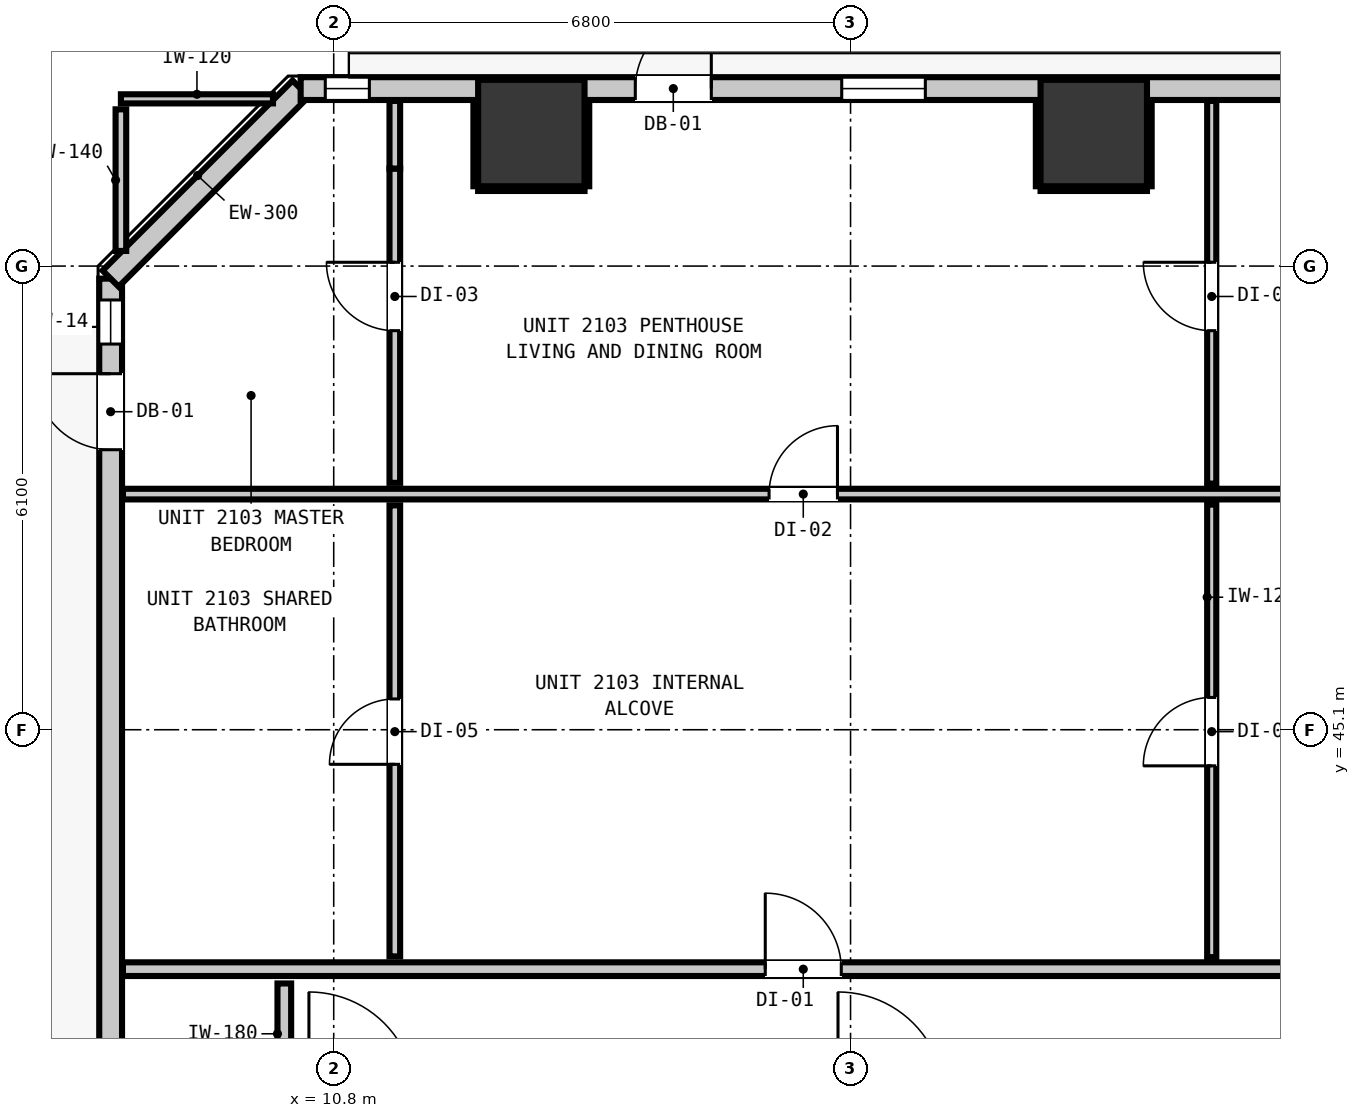
"""IFC4 building model, lengths in metres.
Left out: names, types, materials, properties, quantities, classifications, styles, units other than length and angle.
Written with IfcOpenShell. Run it as: python <this file> out.ifc"""

import sys

from ifc_helpers import new_model, si_unit, direction, frame, frame_2d, origin, origin_2d, place, context, subcontext, project, spatial, rectangle, extrude, element, fill, save


model = new_model("IFC4")
c1 = context("Model", 3, precision=1e-05, world=origin(), true_north=direction((0.0, 1.0)))
c2 = subcontext(c1, "Body", "Model", "MODEL_VIEW")
j1 = project(units=[si_unit("LENGTHUNIT", "METRE"), si_unit("PLANEANGLEUNIT", "RADIAN")], contexts=[c1])
p1 = place(None, origin())
s1 = spatial("IfcSite", under=j1, at=p1, CompositionType="ELEMENT")
p2 = place(p1, origin())
s2 = spatial("IfcBuilding", under=s1, at=p2, CompositionType="ELEMENT")
p3 = place(p2, frame((0.0, 0.0, 75.12)))
s3 = spatial("IfcBuildingStorey", under=s2, at=p3, CompositionType="ELEMENT", Elevation=75.12)
for number, where, z_axis, x_axis in (
    (1, (13.4, 52.95, 0.0), (0.0, 0.0, 1.0), (1.0, 0.0, 0.0)),
    (2, (20.8, 52.95, 0.0), (0.0, 0.0, 1.0), (1.0, 0.0, 0.0)),
):
    element("IfcColumn", number, at=place(p3, frame(where, z_axis=z_axis, x_axis=x_axis)), inside=s3, PredefinedType="COLUMN", context=c2, shape_type="SweptSolid", body=[
        extrude(rectangle(XDim=1.4, YDim=1.4, at=origin_2d()), origin(), (0.0, 0.0, 1.0), 3.32),
    ])
p4 = place(p3, frame((7.865, 16.365, 0.0), z_axis=(0.0, 0.0, 1.0), x_axis=(0.0, 1.0, 0.0)))
e3 = element("IfcWall", 3, at=p4, inside=s3, PredefinedType="STANDARD", context=c2, shape_type="SweptSolid", body=[
    extrude(rectangle(XDim=34.67, YDim=0.3, at=frame_2d((17.335, 0.0))), origin(), (0.0, 0.0, 1.0), 3.06),
])
p5 = place(p4, frame((32.419, 0.0, 0.0)))
e4 = element("IfcOpeningElement", 4, at=p5, cuts=e3, PredefinedType="OPENING", context=c2, shape_type="SweptSolid", body=[
    extrude(rectangle(XDim=1.0, YDim=2.15, at=frame_2d((0.5, 1.075))), frame((0.0, 0.16, 0.0), z_axis=(0.0, -1.0, 0.0), x_axis=(1.0, 0.0, 0.0)), (0.0, 0.0, 1.0), 0.32),
])
p6 = place(p4, frame((33.809, 0.0, 0.85)))
e5 = element("IfcOpeningElement", 5, at=p6, cuts=e3, PredefinedType="OPENING", context=c2, shape_type="SweptSolid", body=[
    extrude(rectangle(XDim=0.58, YDim=1.5, at=frame_2d((0.29, 0.75))), frame((0.0, 0.16, 0.0), z_axis=(0.0, -1.0, 0.0), x_axis=(1.0, 0.0, 0.0)), (0.0, 0.0, 1.0), 0.32),
])
p7 = place(p3, frame((7.865, 51.035, 0.0), z_axis=(0.0, 0.0, 1.0), x_axis=(0.707106781187, 0.707106781187, 0.0)))
e6 = element("IfcWall", 6, at=p7, inside=s3, PredefinedType="STANDARD", context=c2, shape_type="SweptSolid", body=[
    extrude(rectangle(XDim=3.536, YDim=0.3, at=frame_2d((1.768, 0.0))), origin(), (0.0, 0.0, 1.0), 3.06),
])
p8 = place(p3, frame((10.365, 53.535, 0.0), z_axis=(0.0, 0.0, 1.0), x_axis=(1.0, 0.0, 0.0)))
e7 = element("IfcWall", 7, at=p8, inside=s3, PredefinedType="STANDARD", context=c2, shape_type="SweptSolid", body=[
    extrude(rectangle(XDim=37.47, YDim=0.3, at=frame_2d((18.735, 0.0))), origin(), (0.0, 0.0, 1.0), 3.06),
])
p9 = place(p8, frame((4.403, 0.0, 0.0)))
e8 = element("IfcOpeningElement", 8, at=p9, cuts=e7, PredefinedType="OPENING", context=c2, shape_type="SweptSolid", body=[
    extrude(rectangle(XDim=1.0, YDim=2.15, at=frame_2d((0.5, 1.075))), frame((0.0, 0.16, 0.0), z_axis=(0.0, -1.0, 0.0), x_axis=(1.0, 0.0, 0.0)), (0.0, 0.0, 1.0), 0.32),
])
p10 = place(p8, frame((7.119, 0.0, 0.85)))
e9 = element("IfcOpeningElement", 9, at=p10, cuts=e7, PredefinedType="OPENING", context=c2, shape_type="SweptSolid", body=[
    extrude(rectangle(XDim=1.1, YDim=2.05, at=frame_2d((0.55, 1.025))), frame((0.0, 0.16, 0.0), z_axis=(0.0, -1.0, 0.0), x_axis=(1.0, 0.0, 0.0)), (0.0, 0.0, 1.0), 0.32),
])
p11 = place(p8, frame((0.324, 0.0, 0.85)))
e10 = element("IfcOpeningElement", 10, at=p11, cuts=e7, PredefinedType="OPENING", context=c2, shape_type="SweptSolid", body=[
    extrude(rectangle(XDim=0.58, YDim=1.5, at=frame_2d((0.29, 0.75))), frame((0.0, 0.16, 0.0), z_axis=(0.0, -1.0, 0.0), x_axis=(1.0, 0.0, 0.0)), (0.0, 0.0, 1.0), 0.32),
])
p12 = place(p8, frame((14.021, 0.0, 0.85)))
e11 = element("IfcOpeningElement", 11, at=p12, cuts=e7, PredefinedType="OPENING", context=c2, shape_type="SweptSolid", body=[
    extrude(rectangle(XDim=1.1, YDim=2.05, at=frame_2d((0.55, 1.025))), frame((0.0, 0.16, 0.0), z_axis=(0.0, -1.0, 0.0), x_axis=(1.0, 0.0, 0.0)), (0.0, 0.0, 1.0), 0.32),
])
p13 = place(p8, frame((22.597, 0.0, 0.85)))
e12 = element("IfcOpeningElement", 12, at=p13, cuts=e7, PredefinedType="OPENING", context=c2, shape_type="SweptSolid", body=[
    extrude(rectangle(XDim=1.1, YDim=2.05, at=frame_2d((0.55, 1.025))), frame((0.0, 0.16, 0.0), z_axis=(0.0, -1.0, 0.0), x_axis=(1.0, 0.0, 0.0)), (0.0, 0.0, 1.0), 0.32),
])
p14 = place(p8, frame((19.807, 0.0, 0.85)))
e13 = element("IfcOpeningElement", 13, at=p14, cuts=e7, PredefinedType="OPENING", context=c2, shape_type="SweptSolid", body=[
    extrude(rectangle(XDim=0.58, YDim=1.5, at=frame_2d((0.29, 0.75))), frame((0.0, 0.16, 0.0), z_axis=(0.0, -1.0, 0.0), x_axis=(1.0, 0.0, 0.0)), (0.0, 0.0, 1.0), 0.32),
])
p15 = place(p8, frame((30.195, 0.0, 0.85)))
e14 = element("IfcOpeningElement", 14, at=p15, cuts=e7, PredefinedType="OPENING", context=c2, shape_type="SweptSolid", body=[
    extrude(rectangle(XDim=1.1, YDim=2.05, at=frame_2d((0.55, 1.025))), frame((0.0, 0.16, 0.0), z_axis=(0.0, -1.0, 0.0), x_axis=(1.0, 0.0, 0.0)), (0.0, 0.0, 1.0), 0.32),
])
p16 = place(p8, frame((35.078, 0.0, 0.85)))
e15 = element("IfcOpeningElement", 15, at=p16, cuts=e7, PredefinedType="OPENING", context=c2, shape_type="SweptSolid", body=[
    extrude(rectangle(XDim=1.1, YDim=2.05, at=frame_2d((0.55, 1.025))), frame((0.0, 0.16, 0.0), z_axis=(0.0, -1.0, 0.0), x_axis=(1.0, 0.0, 0.0)), (0.0, 0.0, 1.0), 0.32),
])
p17 = place(p3, frame((8.027, 41.95, 0.0), z_axis=(0.0, 0.0, 1.0), x_axis=(1.0, 0.0, 0.0)))
e16 = element("IfcWall", 16, at=p17, inside=s3, PredefinedType="PARTITIONING", context=c2, shape_type="SweptSolid", body=[
    extrude(rectangle(XDim=42.146, YDim=0.18, at=frame_2d((21.073, 0.0))), origin(), (0.0, 0.0, 1.0), 3.06),
])
p18 = place(p17, frame((8.451, 0.0, 0.0)))
e17 = element("IfcOpeningElement", 17, at=p18, cuts=e16, PredefinedType="OPENING", context=c2, shape_type="SweptSolid", body=[
    extrude(rectangle(XDim=1.0, YDim=2.15, at=frame_2d((0.5, 1.075))), frame((0.0, 0.1, 0.0), z_axis=(0.0, -1.0, 0.0), x_axis=(1.0, 0.0, 0.0)), (0.0, 0.0, 1.0), 0.2),
])
p19 = place(p17, frame((26.075, 0.0, 0.0)))
e18 = element("IfcOpeningElement", 18, at=p19, cuts=e16, PredefinedType="OPENING", context=c2, shape_type="SweptSolid", body=[
    extrude(rectangle(XDim=1.0, YDim=2.15, at=frame_2d((0.5, 1.075))), frame((0.0, 0.1, 0.0), z_axis=(0.0, -1.0, 0.0), x_axis=(1.0, 0.0, 0.0)), (0.0, 0.0, 1.0), 0.2),
])
p20 = place(p3, frame((8.027, 48.2, 0.0), z_axis=(0.0, 0.0, 1.0), x_axis=(1.0, 0.0, 0.0)))
e19 = element("IfcWall", 19, at=p20, inside=s3, PredefinedType="PARTITIONING", context=c2, shape_type="SweptSolid", body=[
    extrude(rectangle(XDim=23.097, YDim=0.14, at=frame_2d((11.548, 0.0))), origin(), (0.0, 0.0, 1.0), 3.06),
])
p21 = place(p20, frame((8.501, 0.0, 0.0)))
e20 = element("IfcOpeningElement", 20, at=p21, cuts=e19, PredefinedType="OPENING", context=c2, shape_type="SweptSolid", body=[
    extrude(rectangle(XDim=0.9, YDim=2.1, at=frame_2d((0.45, 1.05))), frame((0.0, 0.08, 0.0), z_axis=(0.0, -1.0, 0.0), x_axis=(1.0, 0.0, 0.0)), (0.0, 0.0, 1.0), 0.16),
])
p22 = place(p3, frame((8.0, 53.4, 0.0), z_axis=(0.0, 0.0, 1.0), x_axis=(1.0, 0.0, 0.0)))
e21 = element("IfcWall", 21, at=p22, inside=s3, PredefinedType="PARTITIONING", context=c2, shape_type="SweptSolid", body=[
    extrude(rectangle(XDim=2.001, YDim=0.12, at=frame_2d((1.0, 0.0))), origin(), (0.0, 0.0, 1.0), 3.06),
])
p23 = place(p3, frame((10.15, 40.438, 0.0), z_axis=(0.0, 0.0, 1.0), x_axis=(0.0, 1.0, 0.0)))
e22 = element("IfcWall", 22, at=p23, inside=s3, PredefinedType="PARTITIONING", context=c2, shape_type="SweptSolid", body=[
    extrude(rectangle(XDim=1.324, YDim=0.18, at=frame_2d((0.662, 0.0))), origin(), (0.0, 0.0, 1.0), 3.06),
])
p24 = place(p3, frame((8.0, 51.399, 0.0), z_axis=(0.0, 0.0, 1.0), x_axis=(0.0, 1.0, 0.0)))
e23 = element("IfcWall", 23, at=p24, inside=s3, PredefinedType="PARTITIONING", context=c2, shape_type="SweptSolid", body=[
    extrude(rectangle(XDim=1.863, YDim=0.14, at=frame_2d((0.932, 0.0))), origin(), (0.0, 0.0, 1.0), 3.06),
])
p25 = place(p3, frame((11.604, 42.118, 0.0), z_axis=(0.0, 0.0, 1.0), x_axis=(0.0, 1.0, 0.0)))
e24 = element("IfcWall", 24, at=p25, inside=s3, PredefinedType="PARTITIONING", context=c2, shape_type="SweptSolid", body=[
    extrude(rectangle(XDim=5.934, YDim=0.14, at=frame_2d((2.967, 0.0))), origin(), (0.0, 0.0, 1.0), 2.445),
])
p26 = place(p25, frame((2.527, 0.0, 0.0)))
e25 = element("IfcOpeningElement", 25, at=p26, cuts=e24, PredefinedType="OPENING", context=c2, shape_type="SweptSolid", body=[
    extrude(rectangle(XDim=0.86, YDim=2.02, at=frame_2d((0.43, 1.01))), frame((0.0, 0.08, 0.0), z_axis=(0.0, -1.0, 0.0), x_axis=(1.0, 0.0, 0.0)), (0.0, 0.0, 1.0), 0.16),
])
p27 = place(p3, frame((11.604, 48.348, 0.0), z_axis=(0.0, 0.0, 1.0), x_axis=(0.0, 1.0, 0.0)))
e26 = element("IfcWall", 26, at=p27, inside=s3, PredefinedType="PARTITIONING", context=c2, shape_type="SweptSolid", body=[
    extrude(rectangle(XDim=4.135, YDim=0.14, at=frame_2d((2.067, 0.0))), origin(), (0.0, 0.0, 1.0), 2.445),
])
p28 = place(p27, frame((2.002, 0.0, 0.0)))
e27 = element("IfcOpeningElement", 27, at=p28, cuts=e26, PredefinedType="OPENING", context=c2, shape_type="SweptSolid", body=[
    extrude(rectangle(XDim=0.9, YDim=2.1, at=frame_2d((0.45, 1.05))), frame((0.0, 0.08, 0.0), z_axis=(0.0, -1.0, 0.0), x_axis=(1.0, 0.0, 0.0)), (0.0, 0.0, 1.0), 0.16),
])
p29 = place(p3, frame((11.604, 52.483, 0.0), z_axis=(0.0, 0.0, 1.0), x_axis=(0.0, 1.0, 0.0)))
e28 = element("IfcWall", 28, at=p29, inside=s3, PredefinedType="PARTITIONING", context=c2, shape_type="SweptSolid", body=[
    extrude(rectangle(XDim=0.89, YDim=0.14, at=frame_2d((0.445, 0.0))), origin(), (0.0, 0.0, 1.0), 3.06),
])
p30 = place(p3, frame((22.352, 42.108, 0.0), z_axis=(0.0, 0.0, 1.0), x_axis=(0.0, 1.0, 0.0)))
e29 = element("IfcWall", 29, at=p30, inside=s3, PredefinedType="PARTITIONING", context=c2, shape_type="SweptSolid", body=[
    extrude(rectangle(XDim=5.954, YDim=0.12, at=frame_2d((2.977, 0.0))), origin(), (0.0, 0.0, 1.0), 3.06),
])
p31 = place(p30, frame((2.517, 0.0, 0.0)))
e30 = element("IfcOpeningElement", 30, at=p31, cuts=e29, PredefinedType="OPENING", context=c2, shape_type="SweptSolid", body=[
    extrude(rectangle(XDim=0.9, YDim=2.1, at=frame_2d((0.45, 1.05))), frame((0.0, 0.07, 0.0), z_axis=(0.0, -1.0, 0.0), x_axis=(1.0, 0.0, 0.0)), (0.0, 0.0, 1.0), 0.14),
])
p32 = place(p3, frame((22.352, 48.338, 0.0), z_axis=(0.0, 0.0, 1.0), x_axis=(0.0, 1.0, 0.0)))
e31 = element("IfcWall", 31, at=p32, inside=s3, PredefinedType="PARTITIONING", context=c2, shape_type="SweptSolid", body=[
    extrude(rectangle(XDim=5.035, YDim=0.12, at=frame_2d((2.518, 0.0))), origin(), (0.0, 0.0, 1.0), 3.06),
])
p33 = place(p32, frame((2.012, 0.0, 0.0)))
e32 = element("IfcOpeningElement", 32, at=p33, cuts=e31, PredefinedType="OPENING", context=c2, shape_type="SweptSolid", body=[
    extrude(rectangle(XDim=0.9, YDim=2.1, at=frame_2d((0.45, 1.05))), frame((0.0, 0.07, 0.0), z_axis=(0.0, -1.0, 0.0), x_axis=(1.0, 0.0, 0.0)), (0.0, 0.0, 1.0), 0.14),
])
p34 = place(p3, frame((12.7, 52.218, 0.0), z_axis=(0.0, 0.0, 1.0), x_axis=(1.0, 0.0, 0.0)))
e33 = element("IfcWall", 33, at=p34, inside=s3, PredefinedType="PARTITIONING", context=c2, shape_type="SweptSolid", body=[
    extrude(rectangle(XDim=1.4, YDim=0.06, at=frame_2d((0.7, 0.0))), origin(), (0.0, 0.0, 1.0), 1.45),
])
for number, where, z_axis, x_axis in (
    (34, (12.668, 52.25, 0.0), (0.0, 0.0, 1.0), (0.0, 1.0, 0.0)),
    (35, (14.132, 52.25, 0.0), (0.0, 0.0, 1.0), (0.0, 1.0, 0.0)),
):
    element("IfcWall", number, at=place(p3, frame(where, z_axis=z_axis, x_axis=x_axis)), inside=s3, PredefinedType="PARTITIONING", context=c2, shape_type="SweptSolid", body=[
        extrude(rectangle(XDim=1.12, YDim=0.06, at=frame_2d((0.56, 0.0))), origin(), (0.0, 0.0, 1.0), 1.45),
    ])
p35 = place(p3, frame((20.1, 52.218, 0.0), z_axis=(0.0, 0.0, 1.0), x_axis=(1.0, 0.0, 0.0)))
e36 = element("IfcWall", 36, at=p35, inside=s3, PredefinedType="PARTITIONING", context=c2, shape_type="SweptSolid", body=[
    extrude(rectangle(XDim=1.4, YDim=0.06, at=frame_2d((0.7, 0.0))), origin(), (0.0, 0.0, 1.0), 1.45),
])
for number, where, z_axis, x_axis in (
    (37, (20.068, 52.25, 0.0), (0.0, 0.0, 1.0), (0.0, 1.0, 0.0)),
    (38, (21.532, 52.25, 0.0), (0.0, 0.0, 1.0), (0.0, 1.0, 0.0)),
):
    element("IfcWall", number, at=place(p3, frame(where, z_axis=z_axis, x_axis=x_axis)), inside=s3, PredefinedType="PARTITIONING", context=c2, shape_type="SweptSolid", body=[
        extrude(rectangle(XDim=1.12, YDim=0.06, at=frame_2d((0.56, 0.0))), origin(), (0.0, 0.0, 1.0), 1.45),
    ])
p36 = place(p9, origin())
e39 = element("IfcDoor", 39, at=p36, inside=s3, OperationType="SINGLE_SWING_RIGHT", PredefinedType="DOOR", context=c2, shape_type="SweptSolid", body=[
    extrude(rectangle(XDim=1.0, YDim=2.15, at=frame_2d((0.5, 1.075))), frame((0.0, 0.025, 0.0), z_axis=(0.0, -1.0, 0.0), x_axis=(1.0, 0.0, 0.0)), (0.0, 0.0, 1.0), 0.05),
])
fill(e8, e39)
p37 = place(p5, origin())
e40 = element("IfcDoor", 40, at=p37, inside=s3, OperationType="SINGLE_SWING_RIGHT", PredefinedType="DOOR", context=c2, shape_type="SweptSolid", body=[
    extrude(rectangle(XDim=1.0, YDim=2.15, at=frame_2d((0.5, 1.075))), frame((0.0, 0.025, 0.0), z_axis=(0.0, -1.0, 0.0), x_axis=(1.0, 0.0, 0.0)), (0.0, 0.0, 1.0), 0.05),
])
fill(e4, e40)
p38 = place(p6, origin())
e41 = element("IfcWindow", 41, at=p38, inside=s3, PartitioningType="SINGLE_PANEL", PredefinedType="WINDOW", context=c2, shape_type="SweptSolid", body=[
    extrude(rectangle(XDim=0.58, YDim=1.5, at=frame_2d((0.29, 0.75))), frame((0.0, 0.03, 0.0), z_axis=(0.0, -1.0, 0.0), x_axis=(1.0, 0.0, 0.0)), (0.0, 0.0, 1.0), 0.06),
])
fill(e5, e41)
p39 = place(p10, origin())
e42 = element("IfcWindow", 42, at=p39, inside=s3, PartitioningType="SINGLE_PANEL", PredefinedType="WINDOW", context=c2, shape_type="SweptSolid", body=[
    extrude(rectangle(XDim=1.1, YDim=2.05, at=frame_2d((0.55, 1.025))), frame((0.0, 0.03, 0.0), z_axis=(0.0, -1.0, 0.0), x_axis=(1.0, 0.0, 0.0)), (0.0, 0.0, 1.0), 0.06),
])
fill(e9, e42)
p40 = place(p11, origin())
e43 = element("IfcWindow", 43, at=p40, inside=s3, PartitioningType="SINGLE_PANEL", PredefinedType="WINDOW", context=c2, shape_type="SweptSolid", body=[
    extrude(rectangle(XDim=0.58, YDim=1.5, at=frame_2d((0.29, 0.75))), frame((0.0, 0.03, 0.0), z_axis=(0.0, -1.0, 0.0), x_axis=(1.0, 0.0, 0.0)), (0.0, 0.0, 1.0), 0.06),
])
fill(e10, e43)
p41 = place(p18, origin())
e44 = element("IfcDoor", 44, at=p41, inside=s3, OperationType="SINGLE_SWING_LEFT", PredefinedType="DOOR", context=c2, shape_type="SweptSolid", body=[
    extrude(rectangle(XDim=1.0, YDim=2.15, at=frame_2d((0.5, 1.075))), frame((0.0, 0.025, 0.0), z_axis=(0.0, -1.0, 0.0), x_axis=(1.0, 0.0, 0.0)), (0.0, 0.0, 1.0), 0.05),
])
fill(e17, e44)
p42 = place(p21, origin())
e45 = element("IfcDoor", 45, at=p42, inside=s3, OperationType="SINGLE_SWING_RIGHT", PredefinedType="DOOR", context=c2, shape_type="SweptSolid", body=[
    extrude(rectangle(XDim=0.9, YDim=2.1, at=frame_2d((0.45, 1.05))), frame((0.0, 0.025, 0.0), z_axis=(0.0, -1.0, 0.0), x_axis=(1.0, 0.0, 0.0)), (0.0, 0.0, 1.0), 0.05),
])
fill(e20, e45)
p43 = place(p26, origin())
e46 = element("IfcDoor", 46, at=p43, inside=s3, OperationType="SINGLE_SWING_LEFT", PredefinedType="DOOR", context=c2, shape_type="SweptSolid", body=[
    extrude(rectangle(XDim=0.86, YDim=2.02, at=frame_2d((0.43, 1.01))), frame((0.0, 0.025, 0.0), z_axis=(0.0, -1.0, 0.0), x_axis=(1.0, 0.0, 0.0)), (0.0, 0.0, 1.0), 0.05),
])
fill(e25, e46)
p44 = place(p28, origin())
e47 = element("IfcDoor", 47, at=p44, inside=s3, OperationType="SINGLE_SWING_RIGHT", PredefinedType="DOOR", context=c2, shape_type="SweptSolid", body=[
    extrude(rectangle(XDim=0.9, YDim=2.1, at=frame_2d((0.45, 1.05))), frame((0.0, 0.025, 0.0), z_axis=(0.0, -1.0, 0.0), x_axis=(1.0, 0.0, 0.0)), (0.0, 0.0, 1.0), 0.05),
])
fill(e27, e47)
p45 = place(p31, origin())
e48 = element("IfcDoor", 48, at=p45, inside=s3, OperationType="SINGLE_SWING_LEFT", PredefinedType="DOOR", context=c2, shape_type="SweptSolid", body=[
    extrude(rectangle(XDim=0.9, YDim=2.1, at=frame_2d((0.45, 1.05))), frame((0.0, 0.025, 0.0), z_axis=(0.0, -1.0, 0.0), x_axis=(1.0, 0.0, 0.0)), (0.0, 0.0, 1.0), 0.05),
])
fill(e30, e48)
p46 = place(p33, origin())
e49 = element("IfcDoor", 49, at=p46, inside=s3, OperationType="SINGLE_SWING_RIGHT", PredefinedType="DOOR", context=c2, shape_type="SweptSolid", body=[
    extrude(rectangle(XDim=0.9, YDim=2.1, at=frame_2d((0.45, 1.05))), frame((0.0, 0.025, 0.0), z_axis=(0.0, -1.0, 0.0), x_axis=(1.0, 0.0, 0.0)), (0.0, 0.0, 1.0), 0.05),
])
fill(e32, e49)
save(model, sys.argv[1])
